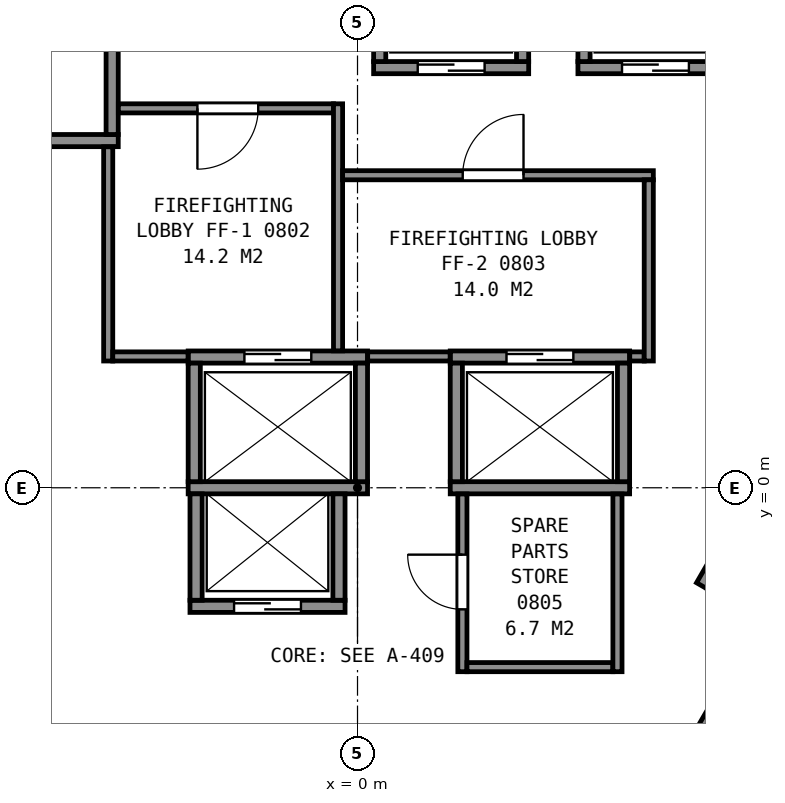
"""IFC4 building model, lengths in metres.
Left out: names, types, materials, properties, quantities, classifications, styles, units other than length and angle.
Written with IfcOpenShell. Run it as: python <this file> out.ifc"""

import sys

from ifc_helpers import new_model, si_unit, direction, frame, frame_2d, origin, place, context, subcontext, project, spatial, rectangle, extrude, element, fill, save


model = new_model("IFC4")
c1 = context("Model", 3, precision=1e-05, world=origin(), true_north=direction((0.0, 1.0)))
c2 = subcontext(c1, "Body", "Model", "MODEL_VIEW")
j1 = project(units=[si_unit("LENGTHUNIT", "METRE"), si_unit("PLANEANGLEUNIT", "RADIAN")], contexts=[c1])
p1 = place(None, origin())
s1 = spatial("IfcSite", under=j1, at=p1, CompositionType="ELEMENT")
p2 = place(p1, origin())
s2 = spatial("IfcBuilding", under=s1, at=p2, CompositionType="ELEMENT")
p3 = place(p2, frame((0.0, 0.0, 44.0)))
s3 = spatial("IfcBuildingStorey", under=s2, at=p3, CompositionType="ELEMENT", Elevation=44.0)
p4 = place(p3, frame((-2.755, -1.95, 0.0), z_axis=(0.0, 0.0, 1.0), x_axis=(1.0, 0.0, 0.0)))
e1 = element("IfcWall", 1, at=p4, inside=s3, PredefinedType="PARTITIONING", context=c2, shape_type="SweptSolid", body=[
    extrude(rectangle(XDim=2.55, YDim=0.2, at=frame_2d((1.275, 0.0))), origin(), (0.0, 0.0, 1.0), 3.6),
])
p5 = place(p4, frame((0.725, 0.0, 0.0)))
e2 = element("IfcOpeningElement", 2, at=p5, cuts=e1, PredefinedType="OPENING", context=c2, shape_type="SweptSolid", body=[
    extrude(rectangle(XDim=1.1, YDim=2.1, at=frame_2d((0.55, 1.05))), frame((0.0, 0.11, 0.0), z_axis=(0.0, -1.0, 0.0), x_axis=(1.0, 0.0, 0.0)), (0.0, 0.0, 1.0), 0.22),
])
p6 = place(p3, frame((-2.785, 0.0, 0.0), z_axis=(0.0, 0.0, 1.0), x_axis=(1.0, 0.0, 0.0)))
e3 = element("IfcWall", 3, at=p6, inside=s3, PredefinedType="PARTITIONING", context=c2, shape_type="SweptSolid", body=[
    extrude(rectangle(XDim=2.95, YDim=0.2, at=frame_2d((1.475, 0.0))), origin(), (0.0, 0.0, 1.0), 3.6),
])
p7 = place(p3, frame((1.525, 0.0, 0.0), z_axis=(0.0, 0.0, 1.0), x_axis=(1.0, 0.0, 0.0)))
e4 = element("IfcWall", 4, at=p7, inside=s3, PredefinedType="PARTITIONING", context=c2, shape_type="SweptSolid", body=[
    extrude(rectangle(XDim=2.95, YDim=0.2, at=frame_2d((1.475, 0.0))), origin(), (0.0, 0.0, 1.0), 3.6),
])
p8 = place(p3, frame((-2.785, 2.15, 0.0), z_axis=(0.0, 0.0, 1.0), x_axis=(1.0, 0.0, 0.0)))
e5 = element("IfcWall", 5, at=p8, inside=s3, PredefinedType="PARTITIONING", context=c2, shape_type="SweptSolid", body=[
    extrude(rectangle(XDim=2.95, YDim=0.2, at=frame_2d((1.475, 0.0))), origin(), (0.0, 0.0, 1.0), 3.6),
])
p9 = place(p8, frame((0.925, 0.0, 0.0)))
e6 = element("IfcOpeningElement", 6, at=p9, cuts=e5, PredefinedType="OPENING", context=c2, shape_type="SweptSolid", body=[
    extrude(rectangle(XDim=1.1, YDim=2.1, at=frame_2d((0.55, 1.05))), frame((0.0, 0.11, 0.0), z_axis=(0.0, -1.0, 0.0), x_axis=(1.0, 0.0, 0.0)), (0.0, 0.0, 1.0), 0.22),
])
p10 = place(p3, frame((1.525, 2.15, 0.0), z_axis=(0.0, 0.0, 1.0), x_axis=(1.0, 0.0, 0.0)))
e7 = element("IfcWall", 7, at=p10, inside=s3, PredefinedType="PARTITIONING", context=c2, shape_type="SweptSolid", body=[
    extrude(rectangle(XDim=2.95, YDim=0.2, at=frame_2d((1.475, 0.0))), origin(), (0.0, 0.0, 1.0), 3.6),
])
p11 = place(p10, frame((0.925, 0.0, 0.0)))
e8 = element("IfcOpeningElement", 8, at=p11, cuts=e7, PredefinedType="OPENING", context=c2, shape_type="SweptSolid", body=[
    extrude(rectangle(XDim=1.1, YDim=2.1, at=frame_2d((0.55, 1.05))), frame((0.0, 0.11, 0.0), z_axis=(0.0, -1.0, 0.0), x_axis=(1.0, 0.0, 0.0)), (0.0, 0.0, 1.0), 0.22),
])
p12 = place(p3, frame((-6.285, 5.71, 0.0), z_axis=(0.0, 0.0, 1.0), x_axis=(1.0, 0.0, 0.0)))
e9 = element("IfcWall", 9, at=p12, inside=s3, PredefinedType="PARTITIONING", context=c2, shape_type="SweptSolid", body=[
    extrude(rectangle(XDim=2.35, YDim=0.2, at=frame_2d((1.175, 0.0))), origin(), (0.0, 0.0, 1.0), 3.6),
])
p13 = place(p3, frame((0.265, 6.91, 0.0), z_axis=(0.0, 0.0, 1.0), x_axis=(1.0, 0.0, 0.0)))
e10 = element("IfcWall", 10, at=p13, inside=s3, PredefinedType="PARTITIONING", context=c2, shape_type="SweptSolid", body=[
    extrude(rectangle(XDim=2.55, YDim=0.2, at=frame_2d((1.275, 0.0))), origin(), (0.0, 0.0, 1.0), 3.6),
])
p14 = place(p13, frame((0.725, 0.0, 0.0)))
e11 = element("IfcOpeningElement", 11, at=p14, cuts=e10, PredefinedType="OPENING", context=c2, shape_type="SweptSolid", body=[
    extrude(rectangle(XDim=1.1, YDim=2.1, at=frame_2d((0.55, 1.05))), frame((0.0, 0.11, 0.0), z_axis=(0.0, -1.0, 0.0), x_axis=(1.0, 0.0, 0.0)), (0.0, 0.0, 1.0), 0.22),
])
p15 = place(p3, frame((3.625, 6.91, 0.0), z_axis=(0.0, 0.0, 1.0), x_axis=(1.0, 0.0, 0.0)))
e12 = element("IfcWall", 12, at=p15, inside=s3, PredefinedType="PARTITIONING", context=c2, shape_type="SweptSolid", body=[
    extrude(rectangle(XDim=2.55, YDim=0.2, at=frame_2d((1.275, 0.0))), origin(), (0.0, 0.0, 1.0), 3.6),
])
p16 = place(p15, frame((0.725, 0.0, 0.0)))
e13 = element("IfcOpeningElement", 13, at=p16, cuts=e12, PredefinedType="OPENING", context=c2, shape_type="SweptSolid", body=[
    extrude(rectangle(XDim=1.1, YDim=2.1, at=frame_2d((0.55, 1.05))), frame((0.0, 0.11, 0.0), z_axis=(0.0, -1.0, 0.0), x_axis=(1.0, 0.0, 0.0)), (0.0, 0.0, 1.0), 0.22),
])
p17 = place(p3, frame((5.527, -4.247, 0.0), z_axis=(0.0, 0.0, 1.0), x_axis=(0.499938297808, 0.866061024631, 0.0)))
e14 = element("IfcWall", 14, at=p17, inside=s3, PredefinedType="PARTITIONING", context=c2, shape_type="SweptSolid", body=[
    extrude(rectangle(XDim=2.35, YDim=0.2, at=frame_2d((1.175, 0.0))), origin(), (0.0, 0.0, 1.0), 3.6),
])
p18 = place(p17, frame((0.725, 0.0, 0.0)))
e15 = element("IfcOpeningElement", 15, at=p18, cuts=e14, PredefinedType="OPENING", context=c2, shape_type="SweptSolid", body=[
    extrude(rectangle(XDim=1.1, YDim=2.1, at=frame_2d((0.55, 1.05))), frame((0.0, 0.11, 0.0), z_axis=(0.0, -1.0, 0.0), x_axis=(1.0, 0.0, 0.0)), (0.0, 0.0, 1.0), 0.22),
])
p19 = place(p3, frame((5.663, -1.612, 0.0), z_axis=(0.0, 0.0, 1.0), x_axis=(0.49998122708, 0.866036242063, 0.0)))
e16 = element("IfcWall", 16, at=p19, inside=s3, PredefinedType="PARTITIONING", context=c2, shape_type="SweptSolid", body=[
    extrude(rectangle(XDim=4.9, YDim=0.2, at=frame_2d((2.45, 0.0))), origin(), (0.0, 0.0, 1.0), 3.6),
])
p20 = place(p3, frame((4.375, 0.1, 0.0), z_axis=(0.0, 0.0, 1.0), x_axis=(0.0, 1.0, 0.0)))
e17 = element("IfcWall", 17, at=p20, inside=s3, PredefinedType="PARTITIONING", context=c2, shape_type="SweptSolid", body=[
    extrude(rectangle(XDim=1.95, YDim=0.2, at=frame_2d((0.975, 0.0))), origin(), (0.0, 0.0, 1.0), 3.6),
])
for number, where, z_axis, x_axis in (
    (18, (3.725, 7.01, 0.0), (0.0, 0.0, 1.0), (0.0, 1.0, 0.0)),
    (19, (2.715, 7.01, 0.0), (0.0, 0.0, 1.0), (0.0, 1.0, 0.0)),
):
    element("IfcWall", number, at=place(p3, frame(where, z_axis=z_axis, x_axis=x_axis)), inside=s3, PredefinedType="PARTITIONING", context=c2, shape_type="SweptSolid", body=[
        extrude(rectangle(XDim=1.75, YDim=0.2, at=frame_2d((0.875, 0.0))), origin(), (0.0, 0.0, 1.0), 3.6),
    ])
p21 = place(p3, frame((1.625, 0.1, 0.0), z_axis=(0.0, 0.0, 1.0), x_axis=(0.0, 1.0, 0.0)))
e20 = element("IfcWall", 20, at=p21, inside=s3, PredefinedType="PARTITIONING", context=c2, shape_type="SweptSolid", body=[
    extrude(rectangle(XDim=1.95, YDim=0.2, at=frame_2d((0.975, 0.0))), origin(), (0.0, 0.0, 1.0), 3.6),
])
p22 = place(p3, frame((0.365, 7.01, 0.0), z_axis=(0.0, 0.0, 1.0), x_axis=(0.0, 1.0, 0.0)))
e21 = element("IfcWall", 21, at=p22, inside=s3, PredefinedType="PARTITIONING", context=c2, shape_type="SweptSolid", body=[
    extrude(rectangle(XDim=1.75, YDim=0.2, at=frame_2d((0.875, 0.0))), origin(), (0.0, 0.0, 1.0), 3.6),
])
p23 = place(p3, frame((0.065, 0.1, 0.0), z_axis=(0.0, 0.0, 1.0), x_axis=(0.0, 1.0, 0.0)))
e22 = element("IfcWall", 22, at=p23, inside=s3, PredefinedType="PARTITIONING", context=c2, shape_type="SweptSolid", body=[
    extrude(rectangle(XDim=1.95, YDim=0.2, at=frame_2d((0.975, 0.0))), origin(), (0.0, 0.0, 1.0), 3.6),
])
for number, where, z_axis, x_axis in (
    (23, (-0.305, -1.85, 0.0), (0.0, 0.0, 1.0), (0.0, 1.0, 0.0)),
    (24, (-2.655, -1.85, 0.0), (0.0, 0.0, 1.0), (0.0, 1.0, 0.0)),
):
    element("IfcWall", number, at=place(p3, frame(where, z_axis=z_axis, x_axis=x_axis)), inside=s3, PredefinedType="PARTITIONING", context=c2, shape_type="SweptSolid", body=[
        extrude(rectangle(XDim=1.75, YDim=0.2, at=frame_2d((0.875, 0.0))), origin(), (0.0, 0.0, 1.0), 3.6),
    ])
p24 = place(p3, frame((-2.685, 0.1, 0.0), z_axis=(0.0, 0.0, 1.0), x_axis=(0.0, 1.0, 0.0)))
e25 = element("IfcWall", 25, at=p24, inside=s3, PredefinedType="PARTITIONING", context=c2, shape_type="SweptSolid", body=[
    extrude(rectangle(XDim=1.95, YDim=0.2, at=frame_2d((0.975, 0.0))), origin(), (0.0, 0.0, 1.0), 3.6),
])
p25 = place(p3, frame((-4.035, 5.81, 0.0), z_axis=(0.0, 0.0, 1.0), x_axis=(0.0, 1.0, 0.0)))
e26 = element("IfcWall", 26, at=p25, inside=s3, PredefinedType="PARTITIONING", context=c2, shape_type="SweptSolid", body=[
    extrude(rectangle(XDim=1.75, YDim=0.2, at=frame_2d((0.875, 0.0))), origin(), (0.0, 0.0, 1.0), 3.6),
])
p26 = place(p3, frame((-13.664, 5.946, 0.0), z_axis=(0.0, 0.0, 1.0), x_axis=(0.499994327219, -0.866028678941, 0.0)))
e27 = element("IfcWall", 27, at=p26, inside=s3, PredefinedType="PARTITIONING", context=c2, shape_type="SweptSolid", body=[
    extrude(rectangle(XDim=23.968, YDim=0.2, at=frame_2d((11.984, 0.0))), origin(), (0.0, 0.0, 1.0), 3.35),
])
p27 = place(p3, frame((-4.152, -5.729, 0.0), z_axis=(0.0, 0.0, 1.0), x_axis=(-0.500024287448, 0.866011380966, 0.0)))
e28 = element("IfcWall", 28, at=p27, inside=s3, PredefinedType="PARTITIONING", context=c2, shape_type="SweptSolid", body=[
    extrude(rectangle(XDim=3.501, YDim=0.15, at=frame_2d((1.75, 0.0))), origin(), (0.0, 0.0, 1.0), 3.35),
])
p28 = place(p27, frame((2.026, 0.0, 0.0)))
e29 = element("IfcOpeningElement", 29, at=p28, cuts=e28, PredefinedType="OPENING", context=c2, shape_type="SweptSolid", body=[
    extrude(rectangle(XDim=0.9, YDim=2.1, at=frame_2d((0.45, 1.05))), frame((0.0, 0.085, 0.0), z_axis=(0.0, -1.0, 0.0), x_axis=(1.0, 0.0, 0.0)), (0.0, 0.0, 1.0), 0.17),
])
p29 = place(p27, frame((0.248, 0.0, 0.0)))
e30 = element("IfcOpeningElement", 30, at=p29, cuts=e28, PredefinedType="OPENING", context=c2, shape_type="SweptSolid", body=[
    extrude(rectangle(XDim=0.9, YDim=2.1, at=frame_2d((0.45, 1.05))), frame((0.0, 0.085, 0.0), z_axis=(0.0, -1.0, 0.0), x_axis=(1.0, 0.0, 0.0)), (0.0, 0.0, 1.0), 0.17),
])
p30 = place(p3, frame((-4.1, 2.085, 0.0), z_axis=(0.0, 0.0, 1.0), x_axis=(0.0, 1.0, 0.0)))
e31 = element("IfcWall", 31, at=p30, inside=s3, PredefinedType="PARTITIONING", context=c2, shape_type="SweptSolid", body=[
    extrude(rectangle(XDim=3.523, YDim=0.15, at=frame_2d((1.761, 0.0))), origin(), (0.0, 0.0, 1.0), 3.35),
])
p31 = place(p3, frame((-4.025, 2.16, 0.0), z_axis=(0.0, 0.0, 1.0), x_axis=(1.0, 0.0, 0.0)))
e32 = element("IfcWall", 32, at=p31, inside=s3, PredefinedType="PARTITIONING", context=c2, shape_type="SweptSolid", body=[
    extrude(rectangle(XDim=1.238, YDim=0.15, at=frame_2d((0.619, 0.0))), origin(), (0.0, 0.0, 1.0), 3.35),
])
p32 = place(p3, frame((-3.933, 6.24, 0.0), z_axis=(0.0, 0.0, 1.0), x_axis=(1.0, 0.0, 0.0)))
e33 = element("IfcWall", 33, at=p32, inside=s3, PredefinedType="PARTITIONING", context=c2, shape_type="SweptSolid", body=[
    extrude(rectangle(XDim=3.538, YDim=0.15, at=frame_2d((1.769, 0.0))), origin(), (0.0, 0.0, 1.0), 3.35),
])
p33 = place(p32, frame((1.3, 0.0, 0.0)))
e34 = element("IfcOpeningElement", 34, at=p33, cuts=e33, PredefinedType="OPENING", context=c2, shape_type="SweptSolid", body=[
    extrude(rectangle(XDim=1.0, YDim=2.1, at=frame_2d((0.5, 1.05))), frame((0.0, 0.085, 0.0), z_axis=(0.0, -1.0, 0.0), x_axis=(1.0, 0.0, 0.0)), (0.0, 0.0, 1.0), 0.17),
])
p34 = place(p3, frame((-0.32, 2.252, 0.0), z_axis=(0.0, 0.0, 1.0), x_axis=(0.0, 1.0, 0.0)))
e35 = element("IfcWall", 35, at=p34, inside=s3, PredefinedType="PARTITIONING", context=c2, shape_type="SweptSolid", body=[
    extrude(rectangle(XDim=4.063, YDim=0.15, at=frame_2d((2.031, 0.0))), origin(), (0.0, 0.0, 1.0), 3.35),
])
p35 = place(p3, frame((-0.245, 5.14, 0.0), z_axis=(0.0, 0.0, 1.0), x_axis=(1.0, 0.0, 0.0)))
e36 = element("IfcWall", 36, at=p35, inside=s3, PredefinedType="PARTITIONING", context=c2, shape_type="SweptSolid", body=[
    extrude(rectangle(XDim=5.11, YDim=0.15, at=frame_2d((2.555, 0.0))), origin(), (0.0, 0.0, 1.0), 3.35),
])
p36 = place(p35, frame((1.975, 0.0, 0.0)))
e37 = element("IfcOpeningElement", 37, at=p36, cuts=e36, PredefinedType="OPENING", context=c2, shape_type="SweptSolid", body=[
    extrude(rectangle(XDim=1.0, YDim=2.1, at=frame_2d((0.5, 1.05))), frame((0.0, 0.085, 0.0), z_axis=(0.0, -1.0, 0.0), x_axis=(1.0, 0.0, 0.0)), (0.0, 0.0, 1.0), 0.17),
])
p37 = place(p3, frame((0.167, 2.16, 0.0), z_axis=(0.0, 0.0, 1.0), x_axis=(1.0, 0.0, 0.0)))
e38 = element("IfcWall", 38, at=p37, inside=s3, PredefinedType="PARTITIONING", context=c2, shape_type="SweptSolid", body=[
    extrude(rectangle(XDim=1.356, YDim=0.15, at=frame_2d((0.678, 0.0))), origin(), (0.0, 0.0, 1.0), 3.35),
])
p38 = place(p3, frame((1.725, -0.102, 0.0), z_axis=(0.0, 0.0, 1.0), x_axis=(0.0, -1.0, 0.0)))
e39 = element("IfcWall", 39, at=p38, inside=s3, PredefinedType="PARTITIONING", context=c2, shape_type="SweptSolid", body=[
    extrude(rectangle(XDim=2.923, YDim=0.15, at=frame_2d((1.461, 0.0))), origin(), (0.0, 0.0, 1.0), 3.35),
])
p39 = place(p38, frame((0.998, 0.0, 0.0)))
e40 = element("IfcOpeningElement", 40, at=p39, cuts=e39, PredefinedType="OPENING", context=c2, shape_type="SweptSolid", body=[
    extrude(rectangle(XDim=0.9, YDim=2.1, at=frame_2d((0.45, 1.05))), frame((0.0, 0.085, 0.0), z_axis=(0.0, -1.0, 0.0), x_axis=(1.0, 0.0, 0.0)), (0.0, 0.0, 1.0), 0.17),
])
p40 = place(p3, frame((1.8, -2.95, 0.0), z_axis=(0.0, 0.0, 1.0), x_axis=(1.0, 0.0, 0.0)))
e41 = element("IfcWall", 41, at=p40, inside=s3, PredefinedType="PARTITIONING", context=c2, shape_type="SweptSolid", body=[
    extrude(rectangle(XDim=2.4, YDim=0.15, at=frame_2d((1.2, 0.0))), origin(), (0.0, 0.0, 1.0), 3.35),
])
p41 = place(p3, frame((4.275, -3.025, 0.0), z_axis=(0.0, 0.0, 1.0), x_axis=(0.0, 1.0, 0.0)))
e42 = element("IfcWall", 42, at=p41, inside=s3, PredefinedType="PARTITIONING", context=c2, shape_type="SweptSolid", body=[
    extrude(rectangle(XDim=2.923, YDim=0.15, at=frame_2d((1.461, 0.0))), origin(), (0.0, 0.0, 1.0), 3.35),
])
p42 = place(p3, frame((4.477, 2.16, 0.0), z_axis=(0.0, 0.0, 1.0), x_axis=(1.0, 0.0, 0.0)))
e43 = element("IfcWall", 43, at=p42, inside=s3, PredefinedType="PARTITIONING", context=c2, shape_type="SweptSolid", body=[
    extrude(rectangle(XDim=0.238, YDim=0.15, at=frame_2d((0.119, 0.0))), origin(), (0.0, 0.0, 1.0), 3.35),
])
p43 = place(p3, frame((4.79, 2.085, 0.0), z_axis=(0.0, 0.0, 1.0), x_axis=(0.0, 1.0, 0.0)))
e44 = element("IfcWall", 44, at=p43, inside=s3, PredefinedType="PARTITIONING", context=c2, shape_type="SweptSolid", body=[
    extrude(rectangle(XDim=2.98, YDim=0.15, at=frame_2d((1.49, 0.0))), origin(), (0.0, 0.0, 1.0), 3.35),
])
p44 = place(p3, frame((-3.766, -16.958, 0.0), z_axis=(0.0, 0.0, 1.0), x_axis=(-0.500024758804, 0.866011108811, 0.0)))
e45 = element("IfcWall", 45, at=p44, inside=s3, PredefinedType="PARTITIONING", context=c2, shape_type="SweptSolid", body=[
    extrude(rectangle(XDim=26.402, YDim=0.125, at=frame_2d((13.201, 0.0))), origin(), (0.0, 0.0, 1.0), 2.613),
])
p45 = place(p44, frame((25.139, 0.0, 0.0)))
e46 = element("IfcOpeningElement", 46, at=p45, cuts=e45, PredefinedType="OPENING", context=c2, shape_type="SweptSolid", body=[
    extrude(rectangle(XDim=0.9, YDim=2.1, at=frame_2d((0.45, 1.05))), frame((0.0, 0.073, 0.0), z_axis=(0.0, -1.0, 0.0), x_axis=(1.0, 0.0, 0.0)), (0.0, 0.0, 1.0), 0.145),
])
p46 = place(p44, frame((22.963, 0.0, 0.0)))
e47 = element("IfcOpeningElement", 47, at=p46, cuts=e45, PredefinedType="OPENING", context=c2, shape_type="SweptSolid", body=[
    extrude(rectangle(XDim=1.0, YDim=2.1, at=frame_2d((0.5, 1.05))), frame((0.0, 0.073, 0.0), z_axis=(0.0, -1.0, 0.0), x_axis=(1.0, 0.0, 0.0)), (0.0, 0.0, 1.0), 0.145),
])
p47 = place(p44, frame((15.228, 0.0, 0.0)))
e48 = element("IfcOpeningElement", 48, at=p47, cuts=e45, PredefinedType="OPENING", context=c2, shape_type="SweptSolid", body=[
    extrude(rectangle(XDim=0.9, YDim=2.1, at=frame_2d((0.45, 1.05))), frame((0.0, 0.073, 0.0), z_axis=(0.0, -1.0, 0.0), x_axis=(1.0, 0.0, 0.0)), (0.0, 0.0, 1.0), 0.145),
])
p48 = place(p44, frame((12.702, 0.0, 0.0)))
e49 = element("IfcOpeningElement", 49, at=p48, cuts=e45, PredefinedType="OPENING", context=c2, shape_type="SweptSolid", body=[
    extrude(rectangle(XDim=0.9, YDim=2.1, at=frame_2d((0.45, 1.05))), frame((0.0, 0.073, 0.0), z_axis=(0.0, -1.0, 0.0), x_axis=(1.0, 0.0, 0.0)), (0.0, 0.0, 1.0), 0.145),
])
p49 = place(p44, frame((5.624, 0.0, 0.0)))
e50 = element("IfcOpeningElement", 50, at=p49, cuts=e45, PredefinedType="OPENING", context=c2, shape_type="SweptSolid", body=[
    extrude(rectangle(XDim=0.9, YDim=2.1, at=frame_2d((0.45, 1.05))), frame((0.0, 0.073, 0.0), z_axis=(0.0, -1.0, 0.0), x_axis=(1.0, 0.0, 0.0)), (0.0, 0.0, 1.0), 0.145),
])
p50 = place(p44, frame((2.843, 0.0, 0.0)))
e51 = element("IfcOpeningElement", 51, at=p50, cuts=e45, PredefinedType="OPENING", context=c2, shape_type="SweptSolid", body=[
    extrude(rectangle(XDim=0.9, YDim=2.1, at=frame_2d((0.45, 1.05))), frame((0.0, 0.073, 0.0), z_axis=(0.0, -1.0, 0.0), x_axis=(1.0, 0.0, 0.0)), (0.0, 0.0, 1.0), 0.145),
])
p51 = place(p3, frame((16.967, 5.906, 0.0), z_axis=(0.0, 0.0, 1.0), x_axis=(-0.500024758804, -0.866011108811, 0.0)))
e52 = element("IfcWall", 52, at=p51, inside=s3, PredefinedType="PARTITIONING", context=c2, shape_type="SweptSolid", body=[
    extrude(rectangle(XDim=26.402, YDim=0.125, at=frame_2d((13.201, 0.0))), origin(), (0.0, 0.0, 1.0), 2.613),
])
p52 = place(p51, frame((24.689, 0.0, 0.0)))
e53 = element("IfcOpeningElement", 53, at=p52, cuts=e52, PredefinedType="OPENING", context=c2, shape_type="SweptSolid", body=[
    extrude(rectangle(XDim=0.9, YDim=2.1, at=frame_2d((0.45, 1.05))), frame((0.0, 0.073, 0.0), z_axis=(0.0, -1.0, 0.0), x_axis=(1.0, 0.0, 0.0)), (0.0, 0.0, 1.0), 0.145),
])
p53 = place(p51, frame((17.709, 0.0, 0.0)))
e54 = element("IfcOpeningElement", 54, at=p53, cuts=e52, PredefinedType="OPENING", context=c2, shape_type="SweptSolid", body=[
    extrude(rectangle(XDim=0.9, YDim=2.1, at=frame_2d((0.45, 1.05))), frame((0.0, 0.073, 0.0), z_axis=(0.0, -1.0, 0.0), x_axis=(1.0, 0.0, 0.0)), (0.0, 0.0, 1.0), 0.145),
])
p54 = place(p51, frame((14.928, 0.0, 0.0)))
e55 = element("IfcOpeningElement", 55, at=p54, cuts=e52, PredefinedType="OPENING", context=c2, shape_type="SweptSolid", body=[
    extrude(rectangle(XDim=0.9, YDim=2.1, at=frame_2d((0.45, 1.05))), frame((0.0, 0.073, 0.0), z_axis=(0.0, -1.0, 0.0), x_axis=(1.0, 0.0, 0.0)), (0.0, 0.0, 1.0), 0.145),
])
p55 = place(p51, frame((8.2, 0.0, 0.0)))
e56 = element("IfcOpeningElement", 56, at=p55, cuts=e52, PredefinedType="OPENING", context=c2, shape_type="SweptSolid", body=[
    extrude(rectangle(XDim=0.9, YDim=2.1, at=frame_2d((0.45, 1.05))), frame((0.0, 0.073, 0.0), z_axis=(0.0, -1.0, 0.0), x_axis=(1.0, 0.0, 0.0)), (0.0, 0.0, 1.0), 0.145),
])
p56 = place(p51, frame((5.473, 0.0, 0.0)))
e57 = element("IfcOpeningElement", 57, at=p56, cuts=e52, PredefinedType="OPENING", context=c2, shape_type="SweptSolid", body=[
    extrude(rectangle(XDim=1.0, YDim=2.1, at=frame_2d((0.5, 1.05))), frame((0.0, 0.073, 0.0), z_axis=(0.0, -1.0, 0.0), x_axis=(1.0, 0.0, 0.0)), (0.0, 0.0, 1.0), 0.145),
])
p57 = place(p14, origin())
e58 = element("IfcDoor", 58, at=p57, inside=s3, OperationType="SLIDING_TO_LEFT", PredefinedType="DOOR", context=c2, shape_type="SweptSolid", body=[
    extrude(rectangle(XDim=1.1, YDim=2.1, at=frame_2d((0.55, 1.05))), frame((0.0, 0.025, 0.0), z_axis=(0.0, -1.0, 0.0), x_axis=(1.0, 0.0, 0.0)), (0.0, 0.0, 1.0), 0.05),
])
fill(e11, e58)
p58 = place(p5, origin())
e59 = element("IfcDoor", 59, at=p58, inside=s3, OperationType="SLIDING_TO_RIGHT", PredefinedType="DOOR", context=c2, shape_type="SweptSolid", body=[
    extrude(rectangle(XDim=1.1, YDim=2.1, at=frame_2d((0.55, 1.05))), frame((0.0, 0.025, 0.0), z_axis=(0.0, -1.0, 0.0), x_axis=(1.0, 0.0, 0.0)), (0.0, 0.0, 1.0), 0.05),
])
fill(e2, e59)
p59 = place(p16, origin())
e60 = element("IfcDoor", 60, at=p59, inside=s3, OperationType="SLIDING_TO_LEFT", PredefinedType="DOOR", context=c2, shape_type="SweptSolid", body=[
    extrude(rectangle(XDim=1.1, YDim=2.1, at=frame_2d((0.55, 1.05))), frame((0.0, 0.025, 0.0), z_axis=(0.0, -1.0, 0.0), x_axis=(1.0, 0.0, 0.0)), (0.0, 0.0, 1.0), 0.05),
])
fill(e13, e60)
p60 = place(p9, origin())
e61 = element("IfcDoor", 61, at=p60, inside=s3, OperationType="SLIDING_TO_LEFT", PredefinedType="DOOR", context=c2, shape_type="SweptSolid", body=[
    extrude(rectangle(XDim=1.1, YDim=2.1, at=frame_2d((0.55, 1.05))), frame((0.0, 0.025, 0.0), z_axis=(0.0, -1.0, 0.0), x_axis=(1.0, 0.0, 0.0)), (0.0, 0.0, 1.0), 0.05),
])
fill(e6, e61)
p61 = place(p11, origin())
e62 = element("IfcDoor", 62, at=p61, inside=s3, OperationType="SLIDING_TO_RIGHT", PredefinedType="DOOR", context=c2, shape_type="SweptSolid", body=[
    extrude(rectangle(XDim=1.1, YDim=2.1, at=frame_2d((0.55, 1.05))), frame((0.0, 0.025, 0.0), z_axis=(0.0, -1.0, 0.0), x_axis=(1.0, 0.0, 0.0)), (0.0, 0.0, 1.0), 0.05),
])
fill(e8, e62)
p62 = place(p33, origin())
e63 = element("IfcDoor", 63, at=p62, inside=s3, OperationType="SINGLE_SWING_LEFT", PredefinedType="DOOR", context=c2, shape_type="SweptSolid", body=[
    extrude(rectangle(XDim=1.0, YDim=2.1, at=frame_2d((0.5, 1.05))), frame((0.0, 0.025, 0.0), z_axis=(0.0, -1.0, 0.0), x_axis=(1.0, 0.0, 0.0)), (0.0, 0.0, 1.0), 0.05),
])
fill(e34, e63)
p63 = place(p36, origin())
e64 = element("IfcDoor", 64, at=p63, inside=s3, OperationType="SINGLE_SWING_RIGHT", PredefinedType="DOOR", context=c2, shape_type="SweptSolid", body=[
    extrude(rectangle(XDim=1.0, YDim=2.1, at=frame_2d((0.5, 1.05))), frame((0.0, 0.025, 0.0), z_axis=(0.0, -1.0, 0.0), x_axis=(1.0, 0.0, 0.0)), (0.0, 0.0, 1.0), 0.05),
])
fill(e37, e64)
p64 = place(p39, origin())
e65 = element("IfcDoor", 65, at=p64, inside=s3, OperationType="SINGLE_SWING_LEFT", PredefinedType="DOOR", context=c2, shape_type="SweptSolid", body=[
    extrude(rectangle(XDim=0.9, YDim=2.1, at=frame_2d((0.45, 1.05))), frame((0.0, 0.025, 0.0), z_axis=(0.0, -1.0, 0.0), x_axis=(1.0, 0.0, 0.0)), (0.0, 0.0, 1.0), 0.05),
])
fill(e40, e65)
save(model, sys.argv[1])
